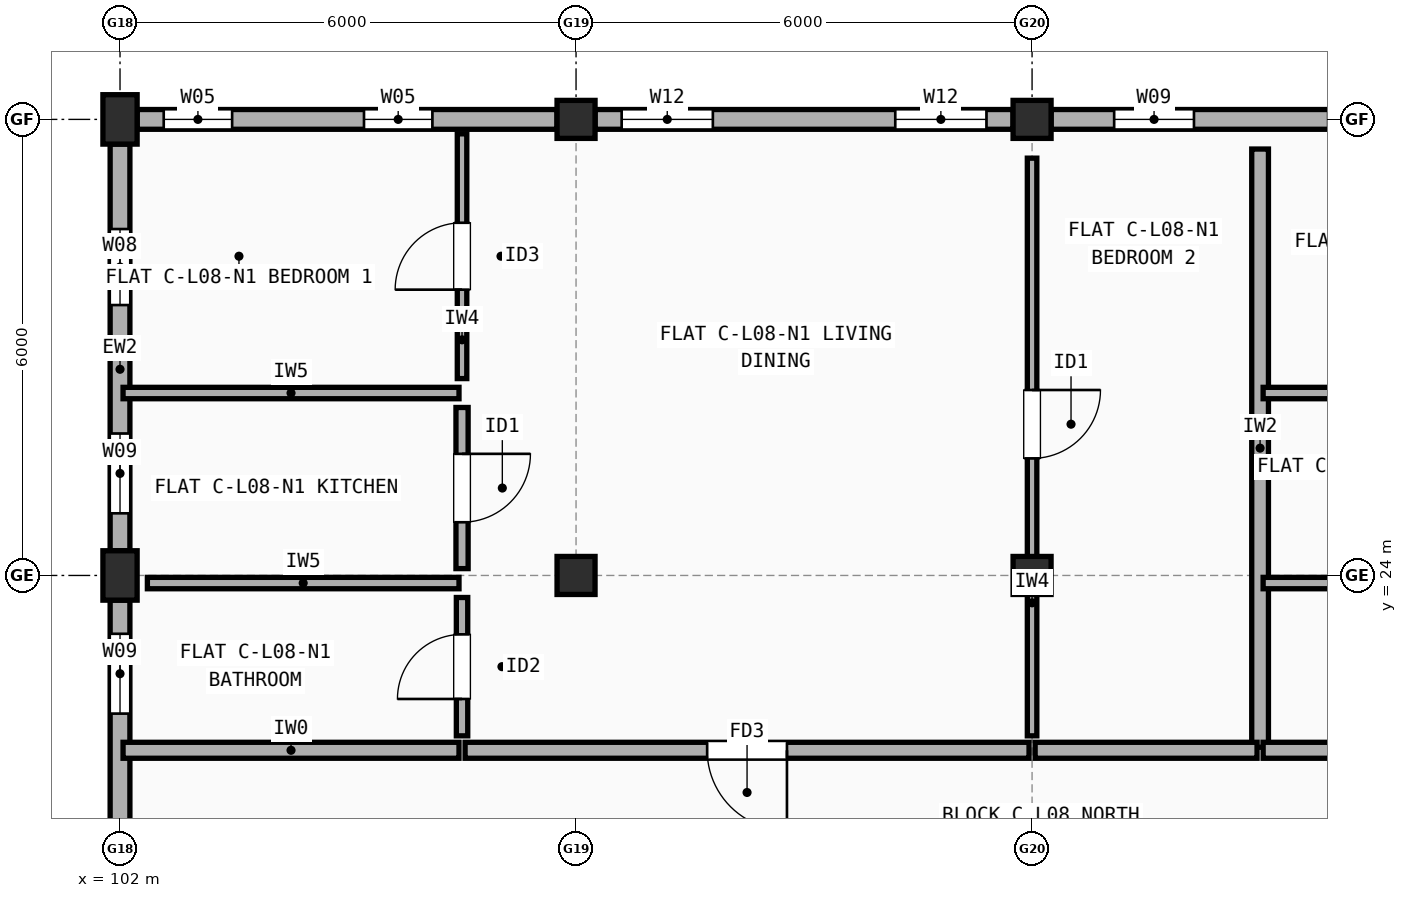
"""IFC4 building model, lengths in metres.
Left out: names, types, materials, properties, quantities, classifications, styles, units other than length and angle.
Written with IfcOpenShell. Run it as: python <this file> out.ifc"""

import sys

from ifc_helpers import new_model, si_unit, direction, frame, frame_2d, origin, origin_2d, place, context, subcontext, project, spatial, rectangle, extrude, element, fill, save


model = new_model("IFC4")
c1 = context("Model", 3, precision=1e-05, world=origin(), true_north=direction((0.0, 1.0)))
c2 = subcontext(c1, "Body", "Model", "MODEL_VIEW")
j1 = project(units=[si_unit("LENGTHUNIT", "METRE"), si_unit("PLANEANGLEUNIT", "RADIAN")], contexts=[c1])
p1 = place(None, origin())
s1 = spatial("IfcSite", under=j1, at=p1, CompositionType="ELEMENT")
p2 = place(p1, origin())
s2 = spatial("IfcBuilding", under=s1, at=p2, CompositionType="ELEMENT")
p3 = place(p2, frame((0.0, 0.0, 26.9)))
s3 = spatial("IfcBuildingStorey", under=s2, at=p3, CompositionType="ELEMENT", Elevation=26.9)
for number, where, z_axis, x_axis in (
    (1, (102.0, 24.0, 0.0), (0.0, 0.0, 1.0), (1.0, 0.0, 0.0)),
    (2, (102.0, 30.0, 0.0), (0.0, 0.0, 1.0), (1.0, 0.0, 0.0)),
):
    element("IfcColumn", number, at=place(p3, frame(where, z_axis=z_axis, x_axis=x_axis)), inside=s3, PredefinedType="COLUMN", context=c2, shape_type="SweptSolid", body=[
        extrude(rectangle(XDim=0.45, YDim=0.65, at=origin_2d()), origin(), (0.0, 0.0, 1.0), 2.98),
    ])
for number, where, z_axis, x_axis in (
    (3, (108.0, 24.0, 0.0), (0.0, 0.0, 1.0), (1.0, 0.0, 0.0)),
    (4, (108.0, 30.0, 0.0), (0.0, 0.0, 1.0), (1.0, 0.0, 0.0)),
    (5, (114.0, 24.0, 0.0), (0.0, 0.0, 1.0), (1.0, 0.0, 0.0)),
    (6, (114.0, 30.0, 0.0), (0.0, 0.0, 1.0), (1.0, 0.0, 0.0)),
):
    element("IfcColumn", number, at=place(p3, frame(where, z_axis=z_axis, x_axis=x_axis)), inside=s3, PredefinedType="COLUMN", context=c2, shape_type="SweptSolid", body=[
        extrude(rectangle(XDim=0.5, YDim=0.5, at=origin_2d()), origin(), (0.0, 0.0, 1.0), 2.98),
    ])
p4 = place(p3, frame((119.75, 30.0, 0.0), z_axis=(0.0, 0.0, 1.0), x_axis=(-1.0, 0.0, 0.0)))
e7 = element("IfcWall", 7, at=p4, inside=s3, PredefinedType="STANDARD", context=c2, shape_type="SweptSolid", body=[
    extrude(rectangle(XDim=5.5, YDim=0.26, at=frame_2d((2.75, 0.0))), origin(), (0.0, 0.0, 1.0), 2.462),
])
p5 = place(p4, frame((0.855, 0.0, 0.9)))
e8 = element("IfcOpeningElement", 8, at=p5, cuts=e7, PredefinedType="OPENING", context=c2, shape_type="SweptSolid", body=[
    extrude(rectangle(XDim=1.0, YDim=1.4, at=frame_2d((0.5, 0.7))), frame((0.0, 0.14, 0.0), z_axis=(0.0, -1.0, 0.0), x_axis=(1.0, 0.0, 0.0)), (0.0, 0.0, 1.0), 0.28),
])
p6 = place(p4, frame((3.62, 0.0, 0.9)))
e9 = element("IfcOpeningElement", 9, at=p6, cuts=e7, PredefinedType="OPENING", context=c2, shape_type="SweptSolid", body=[
    extrude(rectangle(XDim=1.05, YDim=1.35, at=frame_2d((0.525, 0.675))), frame((0.0, 0.14, 0.0), z_axis=(0.0, -1.0, 0.0), x_axis=(1.0, 0.0, 0.0)), (0.0, 0.0, 1.0), 0.28),
])
p7 = place(p3, frame((113.75, 30.0, 0.0), z_axis=(0.0, 0.0, 1.0), x_axis=(-1.0, 0.0, 0.0)))
e10 = element("IfcWall", 10, at=p7, inside=s3, PredefinedType="STANDARD", context=c2, shape_type="SweptSolid", body=[
    extrude(rectangle(XDim=5.5, YDim=0.26, at=frame_2d((2.75, 0.0))), origin(), (0.0, 0.0, 1.0), 2.462),
])
p8 = place(p7, frame((0.35, 0.0, 0.9)))
e11 = element("IfcOpeningElement", 11, at=p8, cuts=e10, PredefinedType="OPENING", context=c2, shape_type="SweptSolid", body=[
    extrude(rectangle(XDim=1.2, YDim=1.35, at=frame_2d((0.6, 0.675))), frame((0.0, 0.14, 0.0), z_axis=(0.0, -1.0, 0.0), x_axis=(1.0, 0.0, 0.0)), (0.0, 0.0, 1.0), 0.28),
])
p9 = place(p7, frame((3.95, 0.0, 0.9)))
e12 = element("IfcOpeningElement", 12, at=p9, cuts=e10, PredefinedType="OPENING", context=c2, shape_type="SweptSolid", body=[
    extrude(rectangle(XDim=1.2, YDim=1.35, at=frame_2d((0.6, 0.675))), frame((0.0, 0.14, 0.0), z_axis=(0.0, -1.0, 0.0), x_axis=(1.0, 0.0, 0.0)), (0.0, 0.0, 1.0), 0.28),
])
p10 = place(p3, frame((107.75, 30.0, 0.0), z_axis=(0.0, 0.0, 1.0), x_axis=(-1.0, 0.0, 0.0)))
e13 = element("IfcWall", 13, at=p10, inside=s3, PredefinedType="STANDARD", context=c2, shape_type="SweptSolid", body=[
    extrude(rectangle(XDim=5.525, YDim=0.26, at=frame_2d((2.762, 0.0))), origin(), (0.0, 0.0, 1.0), 2.462),
])
p11 = place(p10, frame((1.64, 0.0, 0.9)))
e14 = element("IfcOpeningElement", 14, at=p11, cuts=e13, PredefinedType="OPENING", context=c2, shape_type="SweptSolid", body=[
    extrude(rectangle(XDim=0.9, YDim=1.4, at=frame_2d((0.45, 0.7))), frame((0.0, 0.14, 0.0), z_axis=(0.0, -1.0, 0.0), x_axis=(1.0, 0.0, 0.0)), (0.0, 0.0, 1.0), 0.28),
])
p12 = place(p10, frame((4.275, 0.0, 0.9)))
e15 = element("IfcOpeningElement", 15, at=p12, cuts=e13, PredefinedType="OPENING", context=c2, shape_type="SweptSolid", body=[
    extrude(rectangle(XDim=0.9, YDim=1.4, at=frame_2d((0.45, 0.7))), frame((0.0, 0.14, 0.0), z_axis=(0.0, -1.0, 0.0), x_axis=(1.0, 0.0, 0.0)), (0.0, 0.0, 1.0), 0.28),
])
p13 = place(p3, frame((102.0, 29.675, 0.0), z_axis=(0.0, 0.0, 1.0), x_axis=(0.0, -1.0, 0.0)))
e16 = element("IfcWall", 16, at=p13, inside=s3, PredefinedType="STANDARD", context=c2, shape_type="SweptSolid", body=[
    extrude(rectangle(XDim=5.35, YDim=0.26, at=frame_2d((2.675, 0.0))), origin(), (0.0, 0.0, 1.0), 2.462),
])
p14 = place(p13, frame((1.117, 0.0, 0.9)))
e17 = element("IfcOpeningElement", 17, at=p14, cuts=e16, PredefinedType="OPENING", context=c2, shape_type="SweptSolid", body=[
    extrude(rectangle(XDim=1.0, YDim=1.4, at=frame_2d((0.5, 0.7))), frame((0.0, 0.14, 0.0), z_axis=(0.0, -1.0, 0.0), x_axis=(1.0, 0.0, 0.0)), (0.0, 0.0, 1.0), 0.28),
])
p15 = place(p13, frame((3.808, 0.0, 0.9)))
e18 = element("IfcOpeningElement", 18, at=p15, cuts=e16, PredefinedType="OPENING", context=c2, shape_type="SweptSolid", body=[
    extrude(rectangle(XDim=1.05, YDim=1.35, at=frame_2d((0.525, 0.675))), frame((0.0, 0.14, 0.0), z_axis=(0.0, -1.0, 0.0), x_axis=(1.0, 0.0, 0.0)), (0.0, 0.0, 1.0), 0.28),
])
p16 = place(p3, frame((102.0, 23.675, 0.0), z_axis=(0.0, 0.0, 1.0), x_axis=(0.0, -1.0, 0.0)))
e19 = element("IfcWall", 19, at=p16, inside=s3, PredefinedType="STANDARD", context=c2, shape_type="SweptSolid", body=[
    extrude(rectangle(XDim=5.35, YDim=0.26, at=frame_2d((2.675, 0.0))), origin(), (0.0, 0.0, 1.0), 2.462),
])
p17 = place(p16, frame((0.442, 0.0, 0.9)))
e20 = element("IfcOpeningElement", 20, at=p17, cuts=e19, PredefinedType="OPENING", context=c2, shape_type="SweptSolid", body=[
    extrude(rectangle(XDim=1.05, YDim=1.35, at=frame_2d((0.525, 0.675))), frame((0.0, 0.14, 0.0), z_axis=(0.0, -1.0, 0.0), x_axis=(1.0, 0.0, 0.0)), (0.0, 0.0, 1.0), 0.28),
])
p18 = place(p16, frame((2.933, 0.0, 0.9)))
e21 = element("IfcOpeningElement", 21, at=p18, cuts=e19, PredefinedType="OPENING", context=c2, shape_type="SweptSolid", body=[
    extrude(rectangle(XDim=1.5, YDim=1.4, at=frame_2d((0.75, 0.7))), frame((0.0, 0.14, 0.0), z_axis=(0.0, -1.0, 0.0), x_axis=(1.0, 0.0, 0.0)), (0.0, 0.0, 1.0), 0.28),
])
p19 = place(p3, frame((117.0, 21.74, 0.0), z_axis=(0.0, 0.0, 1.0), x_axis=(0.0, 1.0, 0.0)))
e22 = element("IfcWall", 22, at=p19, inside=s3, PredefinedType="SOLIDWALL", context=c2, shape_type="SweptSolid", body=[
    extrude(rectangle(XDim=7.87, YDim=0.22, at=frame_2d((3.935, 0.0))), origin(), (0.0, 0.0, 1.0), 2.548),
])
p20 = place(p3, frame((102.04, 21.7, 0.0), z_axis=(0.0, 0.0, 1.0), x_axis=(1.0, 0.0, 0.0)))
e23 = element("IfcWall", 23, at=p20, inside=s3, PredefinedType="SOLIDWALL", context=c2, shape_type="SweptSolid", body=[
    extrude(rectangle(XDim=4.42, YDim=0.21, at=frame_2d((2.21, 0.0))), origin(), (0.0, 0.0, 1.0), 2.462),
])
p21 = place(p3, frame((106.54, 21.7, 0.0), z_axis=(0.0, 0.0, 1.0), x_axis=(1.0, 0.0, 0.0)))
e24 = element("IfcWall", 24, at=p21, inside=s3, PredefinedType="SOLIDWALL", context=c2, shape_type="SweptSolid", body=[
    extrude(rectangle(XDim=7.42, YDim=0.21, at=frame_2d((3.71, 0.0))), origin(), (0.0, 0.0, 1.0), 2.508),
])
p22 = place(p21, frame((3.185, 0.0, 0.0)))
e25 = element("IfcOpeningElement", 25, at=p22, cuts=e24, PredefinedType="OPENING", context=c2, shape_type="SweptSolid", body=[
    extrude(rectangle(XDim=1.05, YDim=2.15, at=frame_2d((0.525, 1.075))), frame((0.0, 0.115, 0.0), z_axis=(0.0, -1.0, 0.0), x_axis=(1.0, 0.0, 0.0)), (0.0, 0.0, 1.0), 0.23),
])
p23 = place(p3, frame((106.5, 26.59, 0.0), z_axis=(0.0, 0.0, 1.0), x_axis=(0.0, 1.0, 0.0)))
e26 = element("IfcWall", 26, at=p23, inside=s3, PredefinedType="PARTITIONING", context=c2, shape_type="SweptSolid", body=[
    extrude(rectangle(XDim=3.22, YDim=0.125, at=frame_2d((1.61, 0.0))), origin(), (0.0, 0.0, 1.0), 2.98),
])
p24 = place(p23, frame((1.17, 0.0, 0.0)))
e27 = element("IfcOpeningElement", 27, at=p24, cuts=e26, PredefinedType="OPENING", context=c2, shape_type="SweptSolid", body=[
    extrude(rectangle(XDim=0.88, YDim=2.1, at=frame_2d((0.44, 1.05))), frame((0.0, 0.073, 0.0), z_axis=(0.0, -1.0, 0.0), x_axis=(1.0, 0.0, 0.0)), (0.0, 0.0, 1.0), 0.145),
])
p25 = place(p3, frame((106.5, 24.09, 0.0), z_axis=(0.0, 0.0, 1.0), x_axis=(0.0, 1.0, 0.0)))
e28 = element("IfcWall", 28, at=p25, inside=s3, PredefinedType="PLUMBINGWALL", context=c2, shape_type="SweptSolid", body=[
    extrude(rectangle(XDim=2.12, YDim=0.16, at=frame_2d((1.06, 0.0))), origin(), (0.0, 0.0, 1.0), 2.98),
])
p26 = place(p25, frame((0.61, 0.0, 0.0)))
e29 = element("IfcOpeningElement", 29, at=p26, cuts=e28, PredefinedType="OPENING", context=c2, shape_type="SweptSolid", body=[
    extrude(rectangle(XDim=0.9, YDim=2.1, at=frame_2d((0.45, 1.05))), frame((0.0, 0.09, 0.0), z_axis=(0.0, -1.0, 0.0), x_axis=(1.0, 0.0, 0.0)), (0.0, 0.0, 1.0), 0.18),
])
p27 = place(p3, frame((106.5, 21.89, 0.0), z_axis=(0.0, 0.0, 1.0), x_axis=(0.0, 1.0, 0.0)))
e30 = element("IfcWall", 30, at=p27, inside=s3, PredefinedType="PARTITIONING", context=c2, shape_type="SweptSolid", body=[
    extrude(rectangle(XDim=1.82, YDim=0.15, at=frame_2d((0.91, 0.0))), origin(), (0.0, 0.0, 1.0), 2.98),
])
p28 = place(p27, frame((0.485, 0.0, 0.0)))
e31 = element("IfcOpeningElement", 31, at=p28, cuts=e30, PredefinedType="OPENING", context=c2, shape_type="SweptSolid", body=[
    extrude(rectangle(XDim=0.85, YDim=2.1, at=frame_2d((0.425, 1.05))), frame((0.0, 0.085, 0.0), z_axis=(0.0, -1.0, 0.0), x_axis=(1.0, 0.0, 0.0)), (0.0, 0.0, 1.0), 0.17),
])
p29 = place(p3, frame((102.04, 26.4, 0.0), z_axis=(0.0, 0.0, 1.0), x_axis=(1.0, 0.0, 0.0)))
e32 = element("IfcWall", 32, at=p29, inside=s3, PredefinedType="PARTITIONING", context=c2, shape_type="SweptSolid", body=[
    extrude(rectangle(XDim=4.42, YDim=0.15, at=frame_2d((2.21, 0.0))), origin(), (0.0, 0.0, 1.0), 2.462),
])
p30 = place(p3, frame((102.36, 23.9, 0.0), z_axis=(0.0, 0.0, 1.0), x_axis=(1.0, 0.0, 0.0)))
e33 = element("IfcWall", 33, at=p30, inside=s3, PredefinedType="PARTITIONING", context=c2, shape_type="SweptSolid", body=[
    extrude(rectangle(XDim=4.1, YDim=0.15, at=frame_2d((2.05, 0.0))), origin(), (0.0, 0.0, 1.0), 2.508),
])
p31 = place(p3, frame((114.04, 21.7, 0.0), z_axis=(0.0, 0.0, 1.0), x_axis=(1.0, 0.0, 0.0)))
e34 = element("IfcWall", 34, at=p31, inside=s3, PredefinedType="SOLIDWALL", context=c2, shape_type="SweptSolid", body=[
    extrude(rectangle(XDim=2.92, YDim=0.21, at=frame_2d((1.46, 0.0))), origin(), (0.0, 0.0, 1.0), 2.508),
])
p32 = place(p3, frame((114.0, 21.89, 0.0), z_axis=(0.0, 0.0, 1.0), x_axis=(0.0, 1.0, 0.0)))
e35 = element("IfcWall", 35, at=p32, inside=s3, PredefinedType="PARTITIONING", context=c2, shape_type="SweptSolid", body=[
    extrude(rectangle(XDim=7.6, YDim=0.125, at=frame_2d((3.8, 0.0))), origin(), (0.0, 0.0, 1.0), 2.458),
])
p33 = place(p32, frame((3.65, 0.0, 0.0)))
e36 = element("IfcOpeningElement", 36, at=p33, cuts=e35, PredefinedType="OPENING", context=c2, shape_type="SweptSolid", body=[
    extrude(rectangle(XDim=0.9, YDim=2.1, at=frame_2d((0.45, 1.05))), frame((0.0, 0.073, 0.0), z_axis=(0.0, -1.0, 0.0), x_axis=(1.0, 0.0, 0.0)), (0.0, 0.0, 1.0), 0.145),
])
p34 = place(p3, frame((117.04, 21.7, 0.0), z_axis=(0.0, 0.0, 1.0), x_axis=(1.0, 0.0, 0.0)))
e37 = element("IfcWall", 37, at=p34, inside=s3, PredefinedType="SOLIDWALL", context=c2, shape_type="SweptSolid", body=[
    extrude(rectangle(XDim=4.42, YDim=0.21, at=frame_2d((2.21, 0.0))), origin(), (0.0, 0.0, 1.0), 2.98),
])
p35 = place(p3, frame((117.04, 26.4, 0.0), z_axis=(0.0, 0.0, 1.0), x_axis=(1.0, 0.0, 0.0)))
e38 = element("IfcWall", 38, at=p35, inside=s3, PredefinedType="PARTITIONING", context=c2, shape_type="SweptSolid", body=[
    extrude(rectangle(XDim=4.42, YDim=0.15, at=frame_2d((2.21, 0.0))), origin(), (0.0, 0.0, 1.0), 2.458),
])
p36 = place(p3, frame((117.04, 23.9, 0.0), z_axis=(0.0, 0.0, 1.0), x_axis=(1.0, 0.0, 0.0)))
e39 = element("IfcWall", 39, at=p36, inside=s3, PredefinedType="PARTITIONING", context=c2, shape_type="SweptSolid", body=[
    extrude(rectangle(XDim=4.42, YDim=0.15, at=frame_2d((2.21, 0.0))), origin(), (0.0, 0.0, 1.0), 2.508),
])
p37 = place(p6, origin())
e40 = element("IfcWindow", 40, at=p37, inside=s3, PartitioningType="SINGLE_PANEL", PredefinedType="WINDOW", context=c2, shape_type="SweptSolid", body=[
    extrude(rectangle(XDim=1.05, YDim=1.35, at=frame_2d((0.525, 0.675))), frame((0.0, 0.03, 0.0), z_axis=(0.0, -1.0, 0.0), x_axis=(1.0, 0.0, 0.0)), (0.0, 0.0, 1.0), 0.06),
])
fill(e9, e40)
p38 = place(p8, origin())
e41 = element("IfcWindow", 41, at=p38, inside=s3, PartitioningType="SINGLE_PANEL", PredefinedType="WINDOW", context=c2, shape_type="SweptSolid", body=[
    extrude(rectangle(XDim=1.2, YDim=1.35, at=frame_2d((0.6, 0.675))), frame((0.0, 0.03, 0.0), z_axis=(0.0, -1.0, 0.0), x_axis=(1.0, 0.0, 0.0)), (0.0, 0.0, 1.0), 0.06),
])
fill(e11, e41)
p39 = place(p9, origin())
e42 = element("IfcWindow", 42, at=p39, inside=s3, PartitioningType="SINGLE_PANEL", PredefinedType="WINDOW", context=c2, shape_type="SweptSolid", body=[
    extrude(rectangle(XDim=1.2, YDim=1.35, at=frame_2d((0.6, 0.675))), frame((0.0, 0.03, 0.0), z_axis=(0.0, -1.0, 0.0), x_axis=(1.0, 0.0, 0.0)), (0.0, 0.0, 1.0), 0.06),
])
fill(e12, e42)
p40 = place(p11, origin())
e43 = element("IfcWindow", 43, at=p40, inside=s3, PartitioningType="SINGLE_PANEL", PredefinedType="WINDOW", context=c2, shape_type="SweptSolid", body=[
    extrude(rectangle(XDim=0.9, YDim=1.4, at=frame_2d((0.45, 0.7))), frame((0.0, 0.03, 0.0), z_axis=(0.0, -1.0, 0.0), x_axis=(1.0, 0.0, 0.0)), (0.0, 0.0, 1.0), 0.06),
])
fill(e14, e43)
p41 = place(p12, origin())
e44 = element("IfcWindow", 44, at=p41, inside=s3, PartitioningType="SINGLE_PANEL", PredefinedType="WINDOW", context=c2, shape_type="SweptSolid", body=[
    extrude(rectangle(XDim=0.9, YDim=1.4, at=frame_2d((0.45, 0.7))), frame((0.0, 0.03, 0.0), z_axis=(0.0, -1.0, 0.0), x_axis=(1.0, 0.0, 0.0)), (0.0, 0.0, 1.0), 0.06),
])
fill(e15, e44)
p42 = place(p14, origin())
e45 = element("IfcWindow", 45, at=p42, inside=s3, PartitioningType="SINGLE_PANEL", PredefinedType="WINDOW", context=c2, shape_type="SweptSolid", body=[
    extrude(rectangle(XDim=1.0, YDim=1.4, at=frame_2d((0.5, 0.7))), frame((0.0, 0.03, 0.0), z_axis=(0.0, -1.0, 0.0), x_axis=(1.0, 0.0, 0.0)), (0.0, 0.0, 1.0), 0.06),
])
fill(e17, e45)
p43 = place(p15, origin())
e46 = element("IfcWindow", 46, at=p43, inside=s3, PartitioningType="SINGLE_PANEL", PredefinedType="WINDOW", context=c2, shape_type="SweptSolid", body=[
    extrude(rectangle(XDim=1.05, YDim=1.35, at=frame_2d((0.525, 0.675))), frame((0.0, 0.03, 0.0), z_axis=(0.0, -1.0, 0.0), x_axis=(1.0, 0.0, 0.0)), (0.0, 0.0, 1.0), 0.06),
])
fill(e18, e46)
p44 = place(p17, origin())
e47 = element("IfcWindow", 47, at=p44, inside=s3, PartitioningType="SINGLE_PANEL", PredefinedType="WINDOW", context=c2, shape_type="SweptSolid", body=[
    extrude(rectangle(XDim=1.05, YDim=1.35, at=frame_2d((0.525, 0.675))), frame((0.0, 0.03, 0.0), z_axis=(0.0, -1.0, 0.0), x_axis=(1.0, 0.0, 0.0)), (0.0, 0.0, 1.0), 0.06),
])
fill(e20, e47)
p45 = place(p22, origin())
e48 = element("IfcDoor", 48, at=p45, inside=s3, OperationType="SINGLE_SWING_RIGHT", PredefinedType="DOOR", context=c2, shape_type="SweptSolid", body=[
    extrude(rectangle(XDim=1.05, YDim=2.15, at=frame_2d((0.525, 1.075))), frame((0.0, 0.025, 0.0), z_axis=(0.0, -1.0, 0.0), x_axis=(1.0, 0.0, 0.0)), (0.0, 0.0, 1.0), 0.05),
])
fill(e25, e48)
p46 = place(p24, origin())
e49 = element("IfcDoor", 49, at=p46, inside=s3, OperationType="SINGLE_SWING_LEFT", PredefinedType="DOOR", context=c2, shape_type="SweptSolid", body=[
    extrude(rectangle(XDim=0.88, YDim=2.1, at=frame_2d((0.44, 1.05))), frame((0.0, 0.025, 0.0), z_axis=(0.0, -1.0, 0.0), x_axis=(1.0, 0.0, 0.0)), (0.0, 0.0, 1.0), 0.05),
])
fill(e27, e49)
p47 = place(p26, origin())
e50 = element("IfcDoor", 50, at=p47, inside=s3, OperationType="SINGLE_SWING_RIGHT", PredefinedType="DOOR", context=c2, shape_type="SweptSolid", body=[
    extrude(rectangle(XDim=0.9, YDim=2.1, at=frame_2d((0.45, 1.05))), frame((0.0, 0.025, 0.0), z_axis=(0.0, -1.0, 0.0), x_axis=(1.0, 0.0, 0.0)), (0.0, 0.0, 1.0), 0.05),
])
fill(e29, e50)
p48 = place(p28, origin())
e51 = element("IfcDoor", 51, at=p48, inside=s3, OperationType="SINGLE_SWING_LEFT", PredefinedType="DOOR", context=c2, shape_type="SweptSolid", body=[
    extrude(rectangle(XDim=0.85, YDim=2.1, at=frame_2d((0.425, 1.05))), frame((0.0, 0.025, 0.0), z_axis=(0.0, -1.0, 0.0), x_axis=(1.0, 0.0, 0.0)), (0.0, 0.0, 1.0), 0.05),
])
fill(e31, e51)
p49 = place(p33, origin())
e52 = element("IfcDoor", 52, at=p49, inside=s3, OperationType="SINGLE_SWING_RIGHT", PredefinedType="DOOR", context=c2, shape_type="SweptSolid", body=[
    extrude(rectangle(XDim=0.9, YDim=2.1, at=frame_2d((0.45, 1.05))), frame((0.0, 0.025, 0.0), z_axis=(0.0, -1.0, 0.0), x_axis=(1.0, 0.0, 0.0)), (0.0, 0.0, 1.0), 0.05),
])
fill(e36, e52)
save(model, sys.argv[1])
